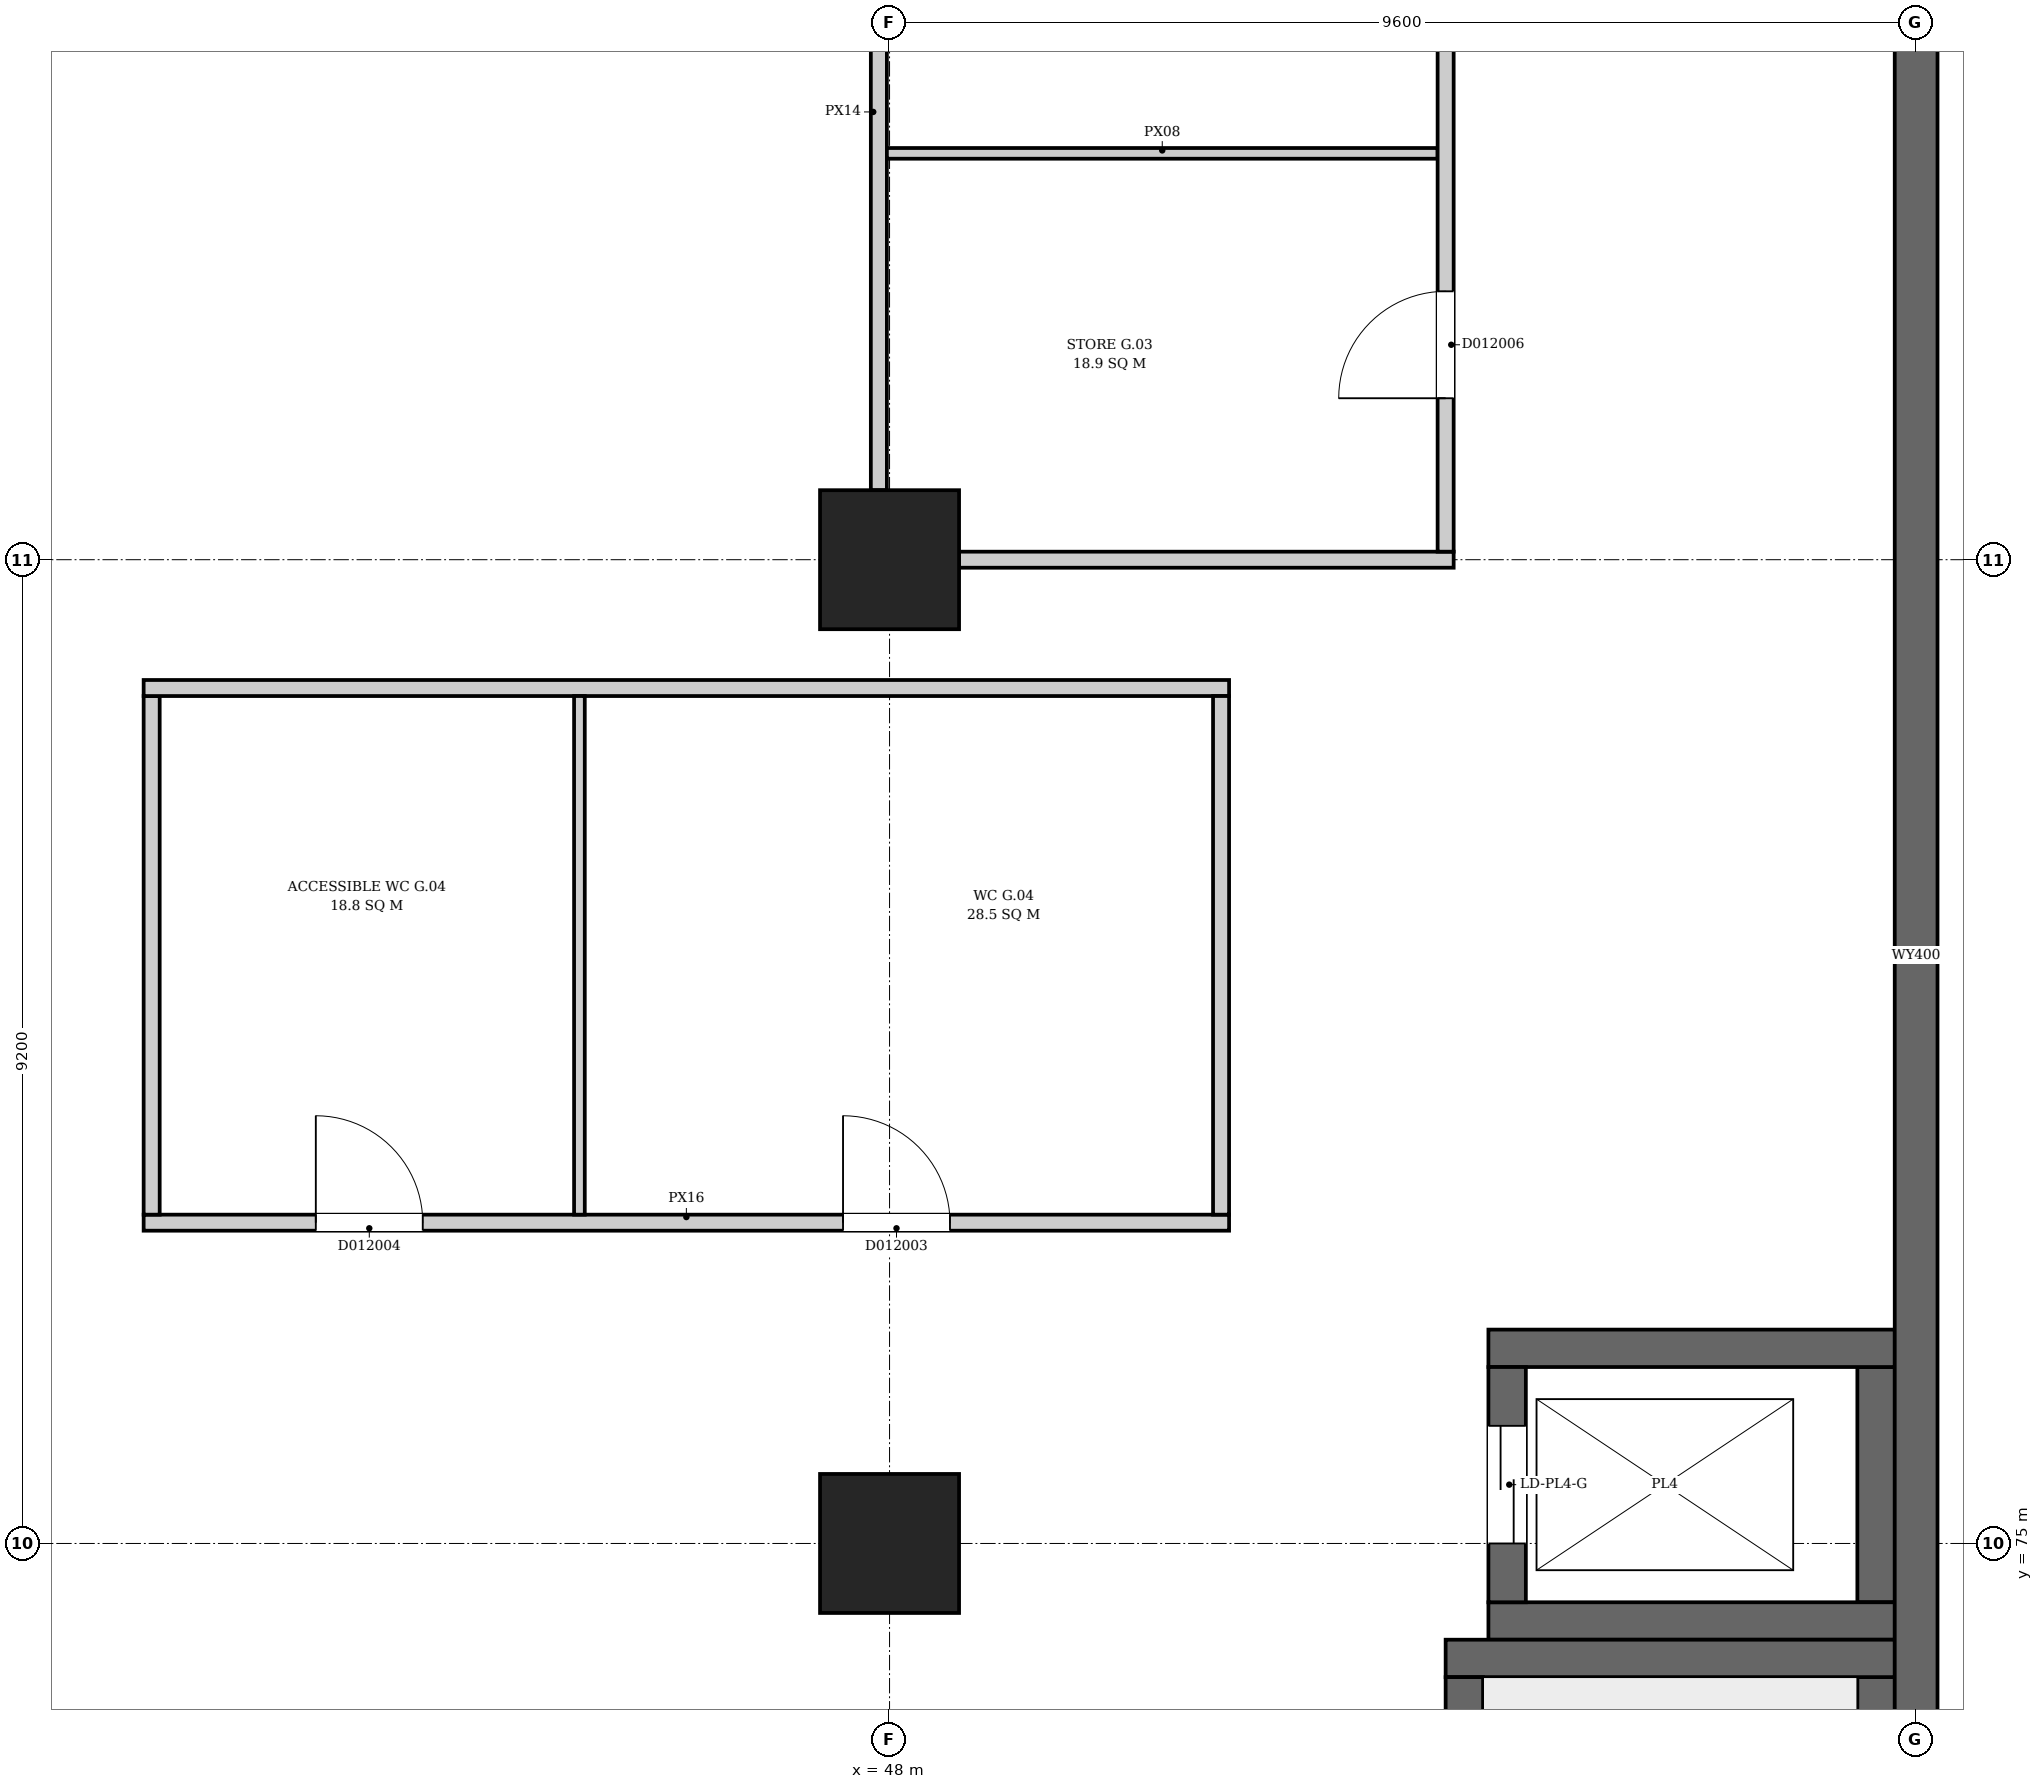
"""IFC4 building model, lengths in metres.
Left out: names, types, materials, properties, quantities, classifications, styles, units other than length and angle.
Written with IfcOpenShell. Run it as: python <this file> out.ifc"""

import sys

from ifc_helpers import new_model, si_unit, direction, frame, frame_2d, origin, origin_2d, place, context, subcontext, project, spatial, rectangle, extrude, element, fill, save


model = new_model("IFC4")
c1 = context("Model", 3, precision=1e-05, world=origin(), true_north=direction((0.0, 1.0)))
c2 = subcontext(c1, "Body", "Model", "MODEL_VIEW")
j1 = project(units=[si_unit("LENGTHUNIT", "METRE"), si_unit("PLANEANGLEUNIT", "RADIAN")], contexts=[c1])
p1 = place(None, origin())
s1 = spatial("IfcSite", under=j1, at=p1, CompositionType="ELEMENT")
p2 = place(p1, origin())
s2 = spatial("IfcBuilding", under=s1, at=p2, CompositionType="ELEMENT")
p3 = place(p2, origin())
s3 = spatial("IfcBuildingStorey", under=s2, at=p3, CompositionType="ELEMENT", Elevation=0.0)
p4 = place(p3, frame((57.6, 46.72, 0.0), z_axis=(0.0, 0.0, 1.0), x_axis=(0.0, 1.0, 0.0)))
e1 = element("IfcWall", 1, at=p4, inside=s3, PredefinedType="SHEAR", context=c2, shape_type="SweptSolid", body=[
    extrude(rectangle(XDim=47.36, YDim=0.4, at=frame_2d((23.68, 0.0))), origin(), (0.0, 0.0, 1.0), 6.5),
])
p5 = place(p4, frame((16.63, 0.0, 0.0)))
e2 = element("IfcOpeningElement", 2, at=p5, cuts=e1, PredefinedType="OPENING", context=c2, shape_type="SweptSolid", body=[
    extrude(rectangle(XDim=3.0, YDim=2.4, at=frame_2d((1.5, 1.2))), frame((0.0, 0.21, 0.0), z_axis=(0.0, -1.0, 0.0), x_axis=(1.0, 0.0, 0.0)), (0.0, 0.0, 1.0), 0.42),
])
p6 = place(p3, frame((53.2, 73.925, 0.0), z_axis=(0.0, 0.0, 1.0), x_axis=(1.0, 0.0, 0.0)))
e3 = element("IfcWall", 3, at=p6, inside=s3, PredefinedType="SHEAR", context=c2, shape_type="SweptSolid", body=[
    extrude(rectangle(XDim=4.2, YDim=0.35, at=frame_2d((2.1, 0.0))), origin(), (0.0, 0.0, 1.0), 6.5),
])
for number, where, z_axis, x_axis in (
    (4, (53.375, 67.05, 0.0), (0.0, 0.0, 1.0), (0.0, 1.0, 0.0)),
    (5, (57.225, 67.05, 0.0), (0.0, 0.0, 1.0), (0.0, 1.0, 0.0)),
):
    element("IfcWall", number, at=place(p3, frame(where, z_axis=z_axis, x_axis=x_axis)), inside=s3, PredefinedType="SHEAR", context=c2, shape_type="SweptSolid", body=[
        extrude(rectangle(XDim=6.7, YDim=0.35, at=frame_2d((3.35, 0.0))), origin(), (0.0, 0.0, 1.0), 6.5),
    ])
for number, where, z_axis, x_axis in (
    (6, (53.6, 74.275, 0.0), (0.0, 0.0, 1.0), (1.0, 0.0, 0.0)),
    (7, (53.6, 76.825, 0.0), (0.0, 0.0, 1.0), (1.0, 0.0, 0.0)),
):
    element("IfcWall", number, at=place(p3, frame(where, z_axis=z_axis, x_axis=x_axis)), inside=s3, PredefinedType="SHEAR", context=c2, shape_type="SweptSolid", body=[
        extrude(rectangle(XDim=3.8, YDim=0.35, at=frame_2d((1.9, 0.0))), origin(), (0.0, 0.0, 1.0), 6.5),
    ])
p7 = place(p3, frame((53.775, 74.45, 0.0), z_axis=(0.0, 0.0, 1.0), x_axis=(0.0, 1.0, 0.0)))
e8 = element("IfcWall", 8, at=p7, inside=s3, PredefinedType="SHEAR", context=c2, shape_type="SweptSolid", body=[
    extrude(rectangle(XDim=2.2, YDim=0.35, at=frame_2d((1.1, 0.0))), origin(), (0.0, 0.0, 1.0), 6.5),
])
p8 = place(p7, frame((0.55, 0.0, 0.0)))
e9 = element("IfcOpeningElement", 9, at=p8, cuts=e8, PredefinedType="OPENING", context=c2, shape_type="SweptSolid", body=[
    extrude(rectangle(XDim=1.1, YDim=2.1, at=frame_2d((0.55, 1.05))), frame((0.0, 0.185, 0.0), z_axis=(0.0, -1.0, 0.0), x_axis=(1.0, 0.0, 0.0)), (0.0, 0.0, 1.0), 0.37),
])
p9 = place(p3, frame((57.225, 74.45, 0.0), z_axis=(0.0, 0.0, 1.0), x_axis=(0.0, 1.0, 0.0)))
e10 = element("IfcWall", 10, at=p9, inside=s3, PredefinedType="SHEAR", context=c2, shape_type="SweptSolid", body=[
    extrude(rectangle(XDim=2.2, YDim=0.35, at=frame_2d((1.1, 0.0))), origin(), (0.0, 0.0, 1.0), 6.5),
])
for number, where, z_axis, x_axis in (
    (11, (48.0, 75.0, 0.0), (0.0, 0.0, 1.0), (1.0, 0.0, 0.0)),
    (12, (48.0, 84.2, 0.0), (0.0, 0.0, 1.0), (1.0, 0.0, 0.0)),
):
    element("IfcColumn", number, at=place(p3, frame(where, z_axis=z_axis, x_axis=x_axis)), inside=s3, PredefinedType="COLUMN", context=c2, shape_type="SweptSolid", body=[
        extrude(rectangle(XDim=1.3, YDim=1.3, at=origin_2d()), origin(), (0.0, 0.0, 1.0), 6.5),
    ])
p10 = place(p3, frame((41.025, 78.0, 0.0), z_axis=(0.0, 0.0, 1.0), x_axis=(1.0, 0.0, 0.0)))
e13 = element("IfcWall", 13, at=p10, inside=s3, PredefinedType="PARTITIONING", context=c2, shape_type="SweptSolid", body=[
    extrude(rectangle(XDim=10.15, YDim=0.15, at=frame_2d((5.075, 0.0))), origin(), (0.0, 0.0, 1.0), 6.05),
])
p11 = place(p10, frame((6.54, 0.0, 0.0)))
e14 = element("IfcOpeningElement", 14, at=p11, cuts=e13, PredefinedType="OPENING", context=c2, shape_type="SweptSolid", body=[
    extrude(rectangle(XDim=1.0, YDim=2.1, at=frame_2d((0.5, 1.05))), frame((0.0, 0.085, 0.0), z_axis=(0.0, -1.0, 0.0), x_axis=(1.0, 0.0, 0.0)), (0.0, 0.0, 1.0), 0.17),
])
p12 = place(p10, frame((1.61, 0.0, 0.0)))
e15 = element("IfcOpeningElement", 15, at=p12, cuts=e13, PredefinedType="OPENING", context=c2, shape_type="SweptSolid", body=[
    extrude(rectangle(XDim=1.0, YDim=2.1, at=frame_2d((0.5, 1.05))), frame((0.0, 0.085, 0.0), z_axis=(0.0, -1.0, 0.0), x_axis=(1.0, 0.0, 0.0)), (0.0, 0.0, 1.0), 0.17),
])
p13 = place(p3, frame((41.1, 78.075, 0.0), z_axis=(0.0, 0.0, 1.0), x_axis=(0.0, 1.0, 0.0)))
e16 = element("IfcWall", 16, at=p13, inside=s3, PredefinedType="PARTITIONING", context=c2, shape_type="SweptSolid", body=[
    extrude(rectangle(XDim=4.85, YDim=0.15, at=frame_2d((2.425, 0.0))), origin(), (0.0, 0.0, 1.0), 6.05),
])
p14 = place(p3, frame((41.025, 83.0, 0.0), z_axis=(0.0, 0.0, 1.0), x_axis=(1.0, 0.0, 0.0)))
e17 = element("IfcWall", 17, at=p14, inside=s3, PredefinedType="PARTITIONING", context=c2, shape_type="SweptSolid", body=[
    extrude(rectangle(XDim=10.15, YDim=0.15, at=frame_2d((5.075, 0.0))), origin(), (0.0, 0.0, 1.0), 6.05),
])
p15 = place(p3, frame((45.1, 78.075, 0.0), z_axis=(0.0, 0.0, 1.0), x_axis=(0.0, 1.0, 0.0)))
e18 = element("IfcWall", 18, at=p15, inside=s3, PredefinedType="PARTITIONING", context=c2, shape_type="SweptSolid", body=[
    extrude(rectangle(XDim=4.85, YDim=0.1, at=frame_2d((2.425, 0.0))), origin(), (0.0, 0.0, 1.0), 6.05),
])
p16 = place(p3, frame((47.9, 84.85, 0.0), z_axis=(0.0, 0.0, 1.0), x_axis=(0.0, 1.0, 0.0)))
e19 = element("IfcWall", 19, at=p16, inside=s3, PredefinedType="PARTITIONING", context=c2, shape_type="SweptSolid", body=[
    extrude(rectangle(XDim=7.075, YDim=0.15, at=frame_2d((3.538, 0.0))), origin(), (0.0, 0.0, 1.0), 5.65),
])
p17 = place(p3, frame((47.975, 88.0, 0.0), z_axis=(0.0, 0.0, 1.0), x_axis=(1.0, 0.0, 0.0)))
e20 = element("IfcWall", 20, at=p17, inside=s3, PredefinedType="PARTITIONING", context=c2, shape_type="SweptSolid", body=[
    extrude(rectangle(XDim=5.15, YDim=0.1, at=frame_2d((2.575, 0.0))), origin(), (0.0, 0.0, 1.0), 6.05),
])
p18 = place(p3, frame((48.65, 84.2, 0.0), z_axis=(0.0, 0.0, 1.0), x_axis=(1.0, 0.0, 0.0)))
e21 = element("IfcWall", 21, at=p18, inside=s3, PredefinedType="PARTITIONING", context=c2, shape_type="SweptSolid", body=[
    extrude(rectangle(XDim=4.625, YDim=0.15, at=frame_2d((2.312, 0.0))), origin(), (0.0, 0.0, 1.0), 5.65),
])
p19 = place(p3, frame((51.1, 78.075, 0.0), z_axis=(0.0, 0.0, 1.0), x_axis=(0.0, 1.0, 0.0)))
e22 = element("IfcWall", 22, at=p19, inside=s3, PredefinedType="PARTITIONING", context=c2, shape_type="SweptSolid", body=[
    extrude(rectangle(XDim=4.85, YDim=0.15, at=frame_2d((2.425, 0.0))), origin(), (0.0, 0.0, 1.0), 6.05),
])
p20 = place(p3, frame((53.2, 84.275, 0.0), z_axis=(0.0, 0.0, 1.0), x_axis=(0.0, 1.0, 0.0)))
e23 = element("IfcWall", 23, at=p20, inside=s3, PredefinedType="PARTITIONING", context=c2, shape_type="SweptSolid", body=[
    extrude(rectangle(XDim=7.65, YDim=0.15, at=frame_2d((3.825, 0.0))), origin(), (0.0, 0.0, 1.0), 6.05),
])
p21 = place(p20, frame((1.435, 0.0, 0.0)))
e24 = element("IfcOpeningElement", 24, at=p21, cuts=e23, PredefinedType="OPENING", context=c2, shape_type="SweptSolid", body=[
    extrude(rectangle(XDim=1.0, YDim=2.1, at=frame_2d((0.5, 1.05))), frame((0.0, 0.085, 0.0), z_axis=(0.0, -1.0, 0.0), x_axis=(1.0, 0.0, 0.0)), (0.0, 0.0, 1.0), 0.17),
])
p22 = place(p20, frame((5.115, 0.0, 0.0)))
e25 = element("IfcOpeningElement", 25, at=p22, cuts=e23, PredefinedType="OPENING", context=c2, shape_type="SweptSolid", body=[
    extrude(rectangle(XDim=1.0, YDim=2.1, at=frame_2d((0.5, 1.05))), frame((0.0, 0.085, 0.0), z_axis=(0.0, -1.0, 0.0), x_axis=(1.0, 0.0, 0.0)), (0.0, 0.0, 1.0), 0.17),
])
p23 = place(p8, origin())
e26 = element("IfcDoor", 26, at=p23, inside=s3, OperationType="DOUBLE_DOOR_SLIDING", PredefinedType="DOOR", context=c2, shape_type="SweptSolid", body=[
    extrude(rectangle(XDim=1.1, YDim=2.1, at=frame_2d((0.55, 1.05))), frame((0.0, 0.025, 0.0), z_axis=(0.0, -1.0, 0.0), x_axis=(1.0, 0.0, 0.0)), (0.0, 0.0, 1.0), 0.05),
])
fill(e9, e26)
p24 = place(p11, origin())
e27 = element("IfcDoor", 27, at=p24, inside=s3, OperationType="SINGLE_SWING_RIGHT", PredefinedType="DOOR", context=c2, shape_type="SweptSolid", body=[
    extrude(rectangle(XDim=1.0, YDim=2.1, at=frame_2d((0.5, 1.05))), frame((0.0, 0.025, 0.0), z_axis=(0.0, -1.0, 0.0), x_axis=(1.0, 0.0, 0.0)), (0.0, 0.0, 1.0), 0.05),
])
fill(e14, e27)
p25 = place(p12, origin())
e28 = element("IfcDoor", 28, at=p25, inside=s3, OperationType="SINGLE_SWING_LEFT", PredefinedType="DOOR", context=c2, shape_type="SweptSolid", body=[
    extrude(rectangle(XDim=1.0, YDim=2.1, at=frame_2d((0.5, 1.05))), frame((0.0, 0.025, 0.0), z_axis=(0.0, -1.0, 0.0), x_axis=(1.0, 0.0, 0.0)), (0.0, 0.0, 1.0), 0.05),
])
fill(e15, e28)
p26 = place(p21, origin())
e29 = element("IfcDoor", 29, at=p26, inside=s3, OperationType="SINGLE_SWING_LEFT", PredefinedType="DOOR", context=c2, shape_type="SweptSolid", body=[
    extrude(rectangle(XDim=1.0, YDim=2.1, at=frame_2d((0.5, 1.05))), frame((0.0, 0.025, 0.0), z_axis=(0.0, -1.0, 0.0), x_axis=(1.0, 0.0, 0.0)), (0.0, 0.0, 1.0), 0.05),
])
fill(e24, e29)
save(model, sys.argv[1])
